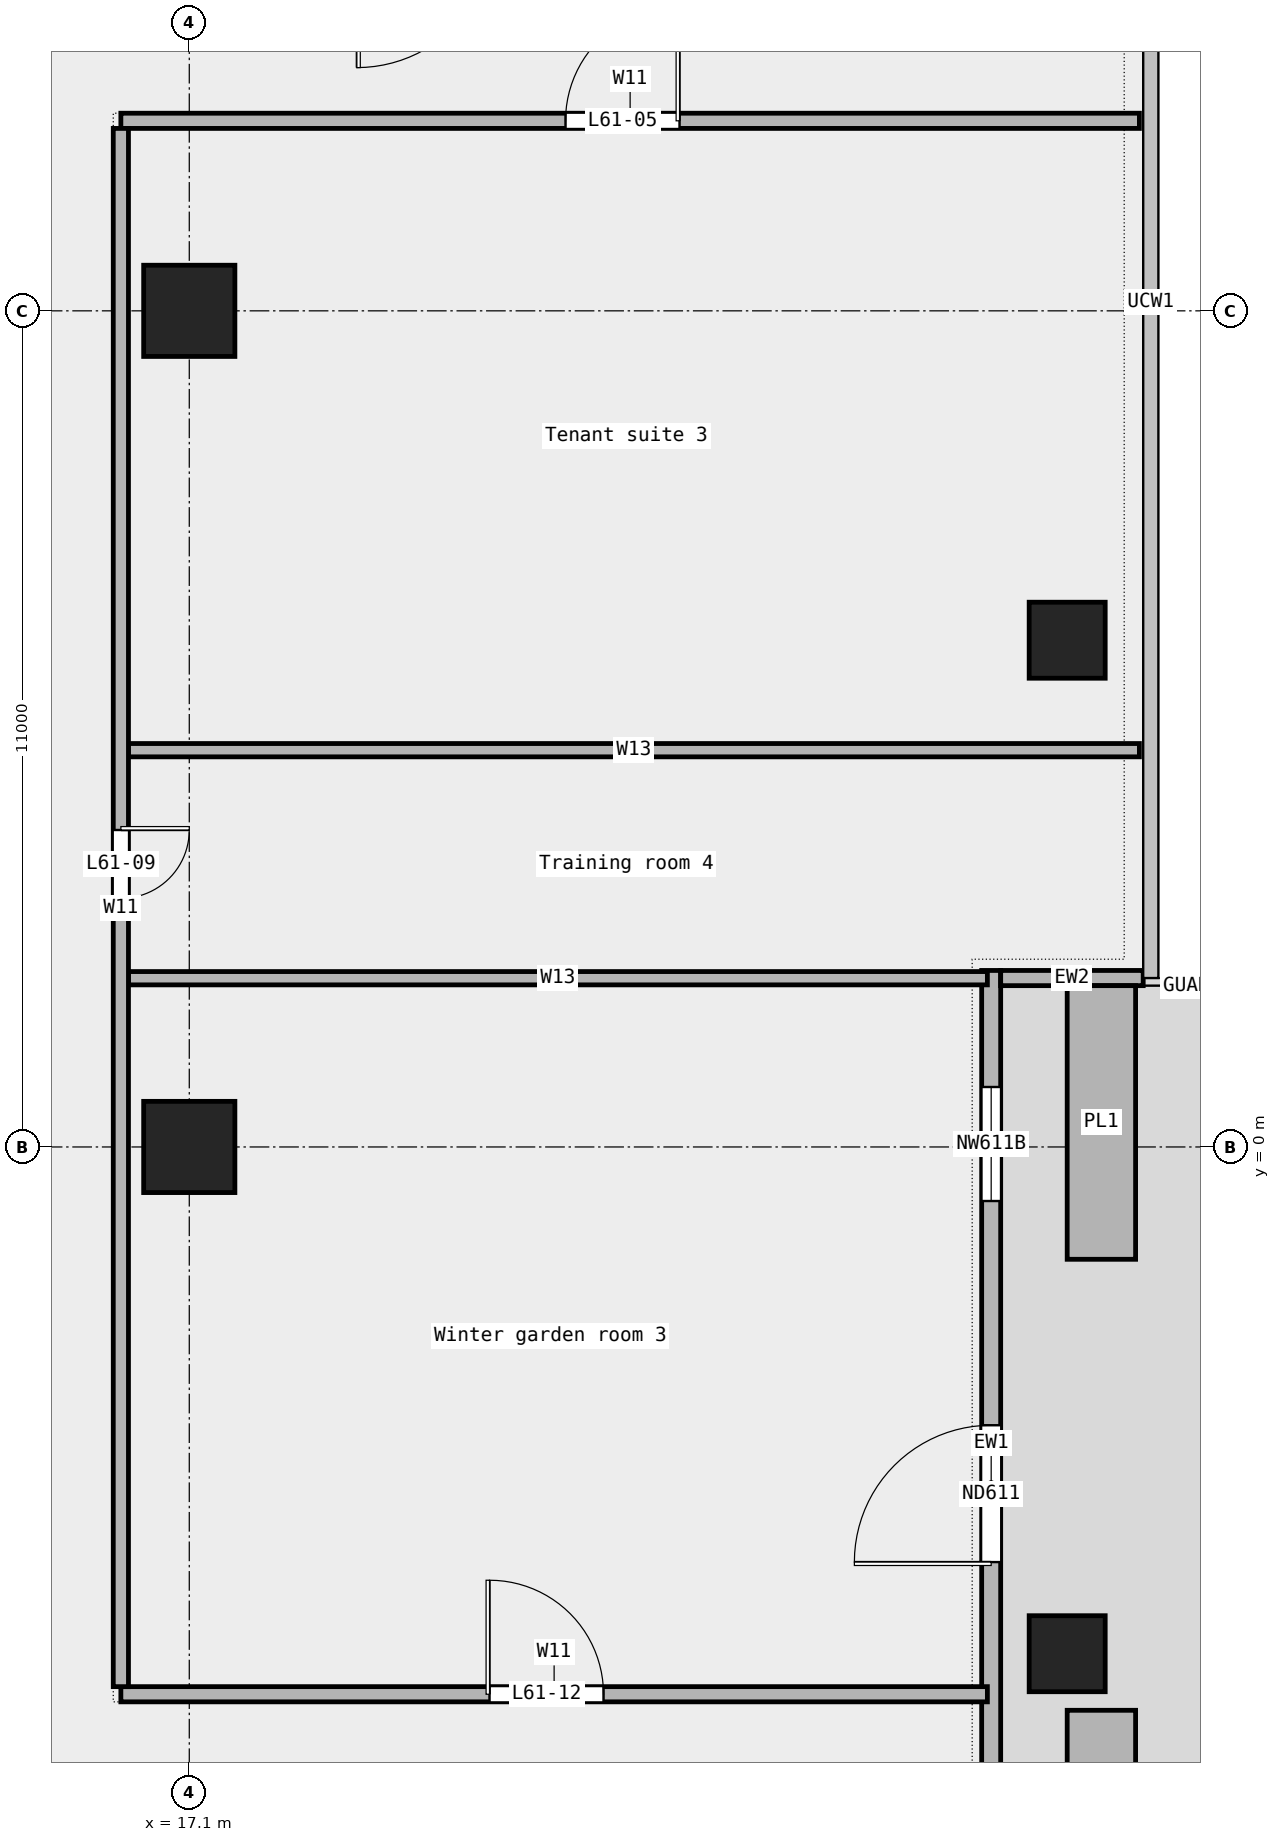
"""IFC4 building model, lengths in metres.
Left out: names, types, materials, properties, quantities, classifications, styles, units other than length and angle.
Written with IfcOpenShell. Run it as: python <this file> out.ifc"""

import sys

from ifc_helpers import new_model, si_unit, direction, frame, frame_2d, origin, origin_2d, place, context, subcontext, project, spatial, rectangle, extrude, element, fill, save


model = new_model("IFC4")
c1 = context("Model", 3, precision=1e-05, world=origin(), true_north=direction((0.0, 1.0)))
c2 = subcontext(c1, "Body", "Model", "MODEL_VIEW")
j1 = project(units=[si_unit("LENGTHUNIT", "METRE"), si_unit("PLANEANGLEUNIT", "RADIAN")], contexts=[c1])
p1 = place(None, origin())
s1 = spatial("IfcSite", under=j1, at=p1, CompositionType="ELEMENT")
p2 = place(p1, origin())
s2 = spatial("IfcBuilding", under=s1, at=p2, CompositionType="ELEMENT")
p3 = place(p2, frame((0.0, 0.0, 283.4)))
s3 = spatial("IfcBuildingStorey", under=s2, at=p3, CompositionType="ELEMENT", Elevation=283.4)
for number, where, z_axis, x_axis in (
    (1, (28.65, -6.667, 0.0), (0.0, 0.0, 1.0), (1.0, 0.0, 0.0)),
    (2, (28.65, 6.667, 0.0), (0.0, 0.0, 1.0), (1.0, 0.0, 0.0)),
):
    element("IfcColumn", number, at=place(p3, frame(where, z_axis=z_axis, x_axis=x_axis)), inside=s3, PredefinedType="COLUMN", context=c2, shape_type="SweptSolid", body=[
        extrude(rectangle(XDim=1.0, YDim=1.0, at=origin_2d()), origin(), (0.0, 0.0, 1.0), 3.6),
    ])
for number, where, z_axis, x_axis in (
    (3, (17.1, 0.0, 0.0), (0.0, 0.0, 1.0), (1.0, 0.0, 0.0)),
    (4, (17.1, 11.0, 0.0), (0.0, 0.0, 1.0), (1.0, 0.0, 0.0)),
):
    element("IfcColumn", number, at=place(p3, frame(where, z_axis=z_axis, x_axis=x_axis)), inside=s3, PredefinedType="COLUMN", context=c2, shape_type="SweptSolid", body=[
        extrude(rectangle(XDim=1.2, YDim=1.2, at=origin_2d()), origin(), (0.0, 0.0, 1.0), 3.6),
    ])
p4 = place(p3, frame((27.65, -11.211, 0.0), z_axis=(0.0, 0.0, 1.0), x_axis=(0.0, 1.0, 0.0)))
e5 = element("IfcWall", 5, at=p4, inside=s3, PredefinedType="STANDARD", context=c2, shape_type="SweptSolid", body=[
    extrude(rectangle(XDim=13.533, YDim=0.25, at=frame_2d((6.767, 0.0))), origin(), (0.0, 0.0, 1.0), 3.6),
])
p5 = place(p4, frame((1.5, 0.0, 0.45)))
e6 = element("IfcOpeningElement", 6, at=p5, cuts=e5, PredefinedType="OPENING", context=c2, shape_type="SweptSolid", body=[
    extrude(rectangle(XDim=1.5, YDim=2.4, at=frame_2d((0.75, 1.2))), frame((0.0, 0.137, 0.0), z_axis=(0.0, -1.0, 0.0), x_axis=(1.0, 0.0, 0.0)), (0.0, 0.0, 1.0), 0.274),
])
p6 = place(p4, frame((5.75, 0.0, 0.0)))
e7 = element("IfcOpeningElement", 7, at=p6, cuts=e5, PredefinedType="OPENING", context=c2, shape_type="SweptSolid", body=[
    extrude(rectangle(XDim=1.8, YDim=2.4, at=frame_2d((0.9, 1.2))), frame((0.0, 0.137, 0.0), z_axis=(0.0, -1.0, 0.0), x_axis=(1.0, 0.0, 0.0)), (0.0, 0.0, 1.0), 0.274),
])
p7 = place(p4, frame((10.5, 0.0, 0.45)))
e8 = element("IfcOpeningElement", 8, at=p7, cuts=e5, PredefinedType="OPENING", context=c2, shape_type="SweptSolid", body=[
    extrude(rectangle(XDim=1.5, YDim=2.4, at=frame_2d((0.75, 1.2))), frame((0.0, 0.137, 0.0), z_axis=(0.0, -1.0, 0.0), x_axis=(1.0, 0.0, 0.0)), (0.0, 0.0, 1.0), 0.274),
])
p8 = place(p3, frame((29.65, 2.222, 0.0), z_axis=(0.0, 0.0, 1.0), x_axis=(-1.0, 0.0, 0.0)))
e9 = element("IfcWall", 9, at=p8, inside=s3, PredefinedType="STANDARD", context=c2, shape_type="SweptSolid", body=[
    extrude(rectangle(XDim=1.875, YDim=0.2, at=frame_2d((0.938, 0.0))), origin(), (0.0, 0.0, 1.0), 3.6),
])
for number, where, z_axis, x_axis in (
    (10, (29.1, -11.011, 0.0), (0.0, 0.0, 1.0), (0.0, 1.0, 0.0)),
    (11, (29.1, -1.478, 0.0), (0.0, 0.0, 1.0), (0.0, 1.0, 0.0)),
):
    element("IfcWall", number, at=place(p3, frame(where, z_axis=z_axis, x_axis=x_axis)), inside=s3, PredefinedType="STANDARD", context=c2, shape_type="SweptSolid", body=[
        extrude(rectangle(XDim=3.6, YDim=0.9, at=frame_2d((1.8, 0.0))), origin(), (0.0, 0.0, 1.0), 0.7),
    ])
p9 = place(p3, frame((16.2, -7.2, 0.0), z_axis=(0.0, 0.0, 1.0), x_axis=(1.0, 0.0, 0.0)))
e12 = element("IfcWall", 12, at=p9, inside=s3, PredefinedType="PARTITIONING", context=c2, shape_type="SweptSolid", body=[
    extrude(rectangle(XDim=11.4, YDim=0.2, at=frame_2d((5.7, 0.0))), origin(), (0.0, 0.0, 1.0), 3.6),
])
p10 = place(p9, frame((4.85, 0.0, 0.0)))
e13 = element("IfcOpeningElement", 13, at=p10, cuts=e12, PredefinedType="OPENING", context=c2, shape_type="SweptSolid", body=[
    extrude(rectangle(XDim=1.5, YDim=2.1, at=frame_2d((0.75, 1.05))), frame((0.0, 0.112, 0.0), z_axis=(0.0, -1.0, 0.0), x_axis=(1.0, 0.0, 0.0)), (0.0, 0.0, 1.0), 0.224),
])
p11 = place(p3, frame((16.3, 2.22, 0.0), z_axis=(0.0, 0.0, 1.0), x_axis=(1.0, 0.0, 0.0)))
e14 = element("IfcWall", 14, at=p11, inside=s3, PredefinedType="PARTITIONING", context=c2, shape_type="SweptSolid", body=[
    extrude(rectangle(XDim=11.3, YDim=0.175, at=frame_2d((5.65, 0.0))), origin(), (0.0, 0.0, 1.0), 3.6),
])
p12 = place(p3, frame((16.3, 5.22, 0.0), z_axis=(0.0, 0.0, 1.0), x_axis=(1.0, 0.0, 0.0)))
e15 = element("IfcWall", 15, at=p12, inside=s3, PredefinedType="PARTITIONING", context=c2, shape_type="SweptSolid", body=[
    extrude(rectangle(XDim=13.3, YDim=0.175, at=frame_2d((6.65, 0.0))), origin(), (0.0, 0.0, 1.0), 3.6),
])
p13 = place(p3, frame((16.2, 13.5, 0.0), z_axis=(0.0, 0.0, 1.0), x_axis=(1.0, 0.0, 0.0)))
e16 = element("IfcWall", 16, at=p13, inside=s3, PredefinedType="PARTITIONING", context=c2, shape_type="SweptSolid", body=[
    extrude(rectangle(XDim=13.4, YDim=0.2, at=frame_2d((6.7, 0.0))), origin(), (0.0, 0.0, 1.0), 3.6),
])
p14 = place(p13, frame((5.85, 0.0, 0.0)))
e17 = element("IfcOpeningElement", 17, at=p14, cuts=e16, PredefinedType="OPENING", context=c2, shape_type="SweptSolid", body=[
    extrude(rectangle(XDim=1.5, YDim=2.1, at=frame_2d((0.75, 1.05))), frame((0.0, 0.112, 0.0), z_axis=(0.0, -1.0, 0.0), x_axis=(1.0, 0.0, 0.0)), (0.0, 0.0, 1.0), 0.224),
])
p15 = place(p3, frame((16.2, -7.1, 0.0), z_axis=(0.0, 0.0, 1.0), x_axis=(0.0, 1.0, 0.0)))
e18 = element("IfcWall", 18, at=p15, inside=s3, PredefinedType="PARTITIONING", context=c2, shape_type="SweptSolid", body=[
    extrude(rectangle(XDim=20.5, YDim=0.2, at=frame_2d((10.25, 0.0))), origin(), (0.0, 0.0, 1.0), 3.6),
])
p16 = place(p15, frame((10.37, 0.0, 0.0)))
e19 = element("IfcOpeningElement", 19, at=p16, cuts=e18, PredefinedType="OPENING", context=c2, shape_type="SweptSolid", body=[
    extrude(rectangle(XDim=0.9, YDim=2.1, at=frame_2d((0.45, 1.05))), frame((0.0, 0.112, 0.0), z_axis=(0.0, -1.0, 0.0), x_axis=(1.0, 0.0, 0.0)), (0.0, 0.0, 1.0), 0.224),
])
p17 = place(p6, origin())
e20 = element("IfcDoor", 20, at=p17, inside=s3, OperationType="DOUBLE_DOOR_SINGLE_SWING", PredefinedType="DOOR", context=c2, shape_type="SweptSolid", body=[
    extrude(rectangle(XDim=1.8, YDim=2.4, at=frame_2d((0.9, 1.2))), frame((0.0, 0.025, 0.0), z_axis=(0.0, -1.0, 0.0), x_axis=(1.0, 0.0, 0.0)), (0.0, 0.0, 1.0), 0.05),
])
fill(e7, e20)
p18 = place(p7, origin())
e21 = element("IfcWindow", 21, at=p18, inside=s3, PartitioningType="SINGLE_PANEL", PredefinedType="WINDOW", context=c2, shape_type="SweptSolid", body=[
    extrude(rectangle(XDim=1.5, YDim=2.4, at=frame_2d((0.75, 1.2))), frame((0.0, 0.03, 0.0), z_axis=(0.0, -1.0, 0.0), x_axis=(1.0, 0.0, 0.0)), (0.0, 0.0, 1.0), 0.06),
])
fill(e8, e21)
p19 = place(p14, origin())
e22 = element("IfcDoor", 22, at=p19, inside=s3, OperationType="DOUBLE_DOOR_SINGLE_SWING", PredefinedType="DOOR", context=c2, shape_type="SweptSolid", body=[
    extrude(rectangle(XDim=1.5, YDim=2.1, at=frame_2d((0.75, 1.05))), frame((0.0, 0.025, 0.0), z_axis=(0.0, -1.0, 0.0), x_axis=(1.0, 0.0, 0.0)), (0.0, 0.0, 1.0), 0.05),
])
fill(e17, e22)
p20 = place(p16, origin())
e23 = element("IfcDoor", 23, at=p20, inside=s3, OperationType="SINGLE_SWING_LEFT", PredefinedType="DOOR", context=c2, shape_type="SweptSolid", body=[
    extrude(rectangle(XDim=0.9, YDim=2.1, at=frame_2d((0.45, 1.05))), frame((0.0, 0.025, 0.0), z_axis=(0.0, -1.0, 0.0), x_axis=(1.0, 0.0, 0.0)), (0.0, 0.0, 1.0), 0.05),
])
fill(e19, e23)
p21 = place(p10, origin())
e24 = element("IfcDoor", 24, at=p21, inside=s3, OperationType="DOUBLE_DOOR_SINGLE_SWING", PredefinedType="DOOR", context=c2, shape_type="SweptSolid", body=[
    extrude(rectangle(XDim=1.5, YDim=2.1, at=frame_2d((0.75, 1.05))), frame((0.0, 0.025, 0.0), z_axis=(0.0, -1.0, 0.0), x_axis=(1.0, 0.0, 0.0)), (0.0, 0.0, 1.0), 0.05),
])
fill(e13, e24)
save(model, sys.argv[1])
